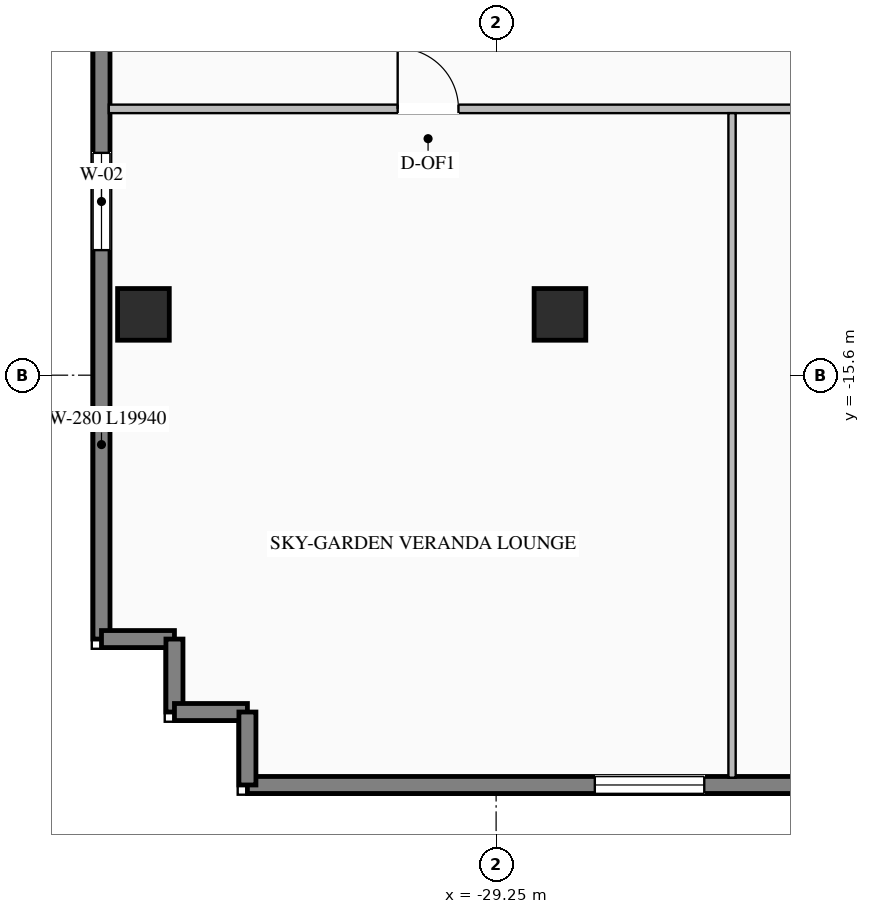
"""IFC4 building model, lengths in metres.
Left out: names, types, materials, properties, quantities, classifications, styles, units other than length and angle.
Written with IfcOpenShell. Run it as: python <this file> out.ifc"""

import sys

from ifc_helpers import new_model, si_unit, direction, frame, frame_2d, origin, origin_2d, place, context, subcontext, project, spatial, rectangle, i_section, extrude, element, fill, save


model = new_model("IFC4")
c1 = context("Model", 3, precision=1e-05, world=origin(), true_north=direction((0.0, 1.0)))
c2 = subcontext(c1, "Body", "Model", "MODEL_VIEW")
j1 = project(units=[si_unit("LENGTHUNIT", "METRE"), si_unit("PLANEANGLEUNIT", "RADIAN")], contexts=[c1])
p1 = place(None, origin())
s1 = spatial("IfcSite", under=j1, at=p1, CompositionType="ELEMENT")
p2 = place(p1, origin())
s2 = spatial("IfcBuilding", under=s1, at=p2, CompositionType="ELEMENT")
p3 = place(p2, frame((0.0, 0.0, 41.55)))
s3 = spatial("IfcBuildingStorey", under=s2, at=p3, CompositionType="ELEMENT", Elevation=41.55)
for number, where, z_axis, x_axis in (
    (1, (-28.2, -14.6, 0.0), (0.0, 0.0, 1.0), (1.0, 0.0, 0.0)),
    (2, (-35.05, -14.6, 0.0), (0.0, 0.0, 1.0), (1.0, 0.0, 0.0)),
):
    element("IfcColumn", number, at=place(p3, frame(where, z_axis=z_axis, x_axis=x_axis)), inside=s3, PredefinedType="COLUMN", context=c2, shape_type="SweptSolid", body=[
        extrude(i_section(OverallWidth=0.85, OverallDepth=0.85, WebThickness=0.032, FlangeThickness=0.048, at=origin_2d()), origin(), (0.0, 0.0, 1.0), 3.45),
    ])
p4 = place(p3, frame((-13.5, -22.34, 0.0), z_axis=(0.0, 0.0, 1.0), x_axis=(-1.0, 0.0, 0.0)))
e3 = element("IfcWall", 3, at=p4, inside=s3, PredefinedType="STANDARD", context=c2, shape_type="SweptSolid", body=[
    extrude(rectangle(XDim=19.84, YDim=0.28, at=frame_2d((9.92, 0.0))), origin(), (0.0, 0.0, 1.0), 3.25),
])
p5 = place(p4, frame((5.713, 0.0, 0.76)))
e4 = element("IfcOpeningElement", 4, at=p5, cuts=e3, PredefinedType="OPENING", context=c2, shape_type="SweptSolid", body=[
    extrude(rectangle(XDim=1.8, YDim=1.95, at=frame_2d((0.9, 0.975))), frame((0.0, 0.15, 0.0), z_axis=(0.0, -1.0, 0.0), x_axis=(1.0, 0.0, 0.0)), (0.0, 0.0, 1.0), 0.3),
])
p6 = place(p4, frame((12.327, 0.0, 0.76)))
e5 = element("IfcOpeningElement", 5, at=p6, cuts=e3, PredefinedType="OPENING", context=c2, shape_type="SweptSolid", body=[
    extrude(rectangle(XDim=1.8, YDim=1.95, at=frame_2d((0.9, 0.975))), frame((0.0, 0.15, 0.0), z_axis=(0.0, -1.0, 0.0), x_axis=(1.0, 0.0, 0.0)), (0.0, 0.0, 1.0), 0.3),
])
p7 = place(p3, frame((-35.74, -19.94, 0.0), z_axis=(0.0, 0.0, 1.0), x_axis=(0.0, 1.0, 0.0)))
e6 = element("IfcWall", 6, at=p7, inside=s3, PredefinedType="STANDARD", context=c2, shape_type="SweptSolid", body=[
    extrude(rectangle(XDim=19.94, YDim=0.28, at=frame_2d((9.97, 0.0))), origin(), (0.0, 0.0, 1.0), 3.25),
])
p8 = place(p7, frame((6.397, 0.0, 0.76)))
e7 = element("IfcOpeningElement", 7, at=p8, cuts=e6, PredefinedType="OPENING", context=c2, shape_type="SweptSolid", body=[
    extrude(rectangle(XDim=1.6, YDim=1.95, at=frame_2d((0.8, 0.975))), frame((0.0, 0.15, 0.0), z_axis=(0.0, -1.0, 0.0), x_axis=(1.0, 0.0, 0.0)), (0.0, 0.0, 1.0), 0.3),
])
p9 = place(p7, frame((12.493, 0.0, 0.76)))
e8 = element("IfcOpeningElement", 8, at=p9, cuts=e6, PredefinedType="OPENING", context=c2, shape_type="SweptSolid", body=[
    extrude(rectangle(XDim=1.6, YDim=1.95, at=frame_2d((0.8, 0.975))), frame((0.0, 0.15, 0.0), z_axis=(0.0, -1.0, 0.0), x_axis=(1.0, 0.0, 0.0)), (0.0, 0.0, 1.0), 0.3),
])
for number, where, z_axis, x_axis in (
    (9, (-35.74, -19.94, 0.0), (0.0, 0.0, 1.0), (1.0, 0.0, 0.0)),
    (10, (-34.54, -19.94, 0.0), (0.0, 0.0, 1.0), (0.0, -1.0, 0.0)),
    (11, (-34.54, -21.14, 0.0), (0.0, 0.0, 1.0), (1.0, 0.0, 0.0)),
):
    element("IfcWall", number, at=place(p3, frame(where, z_axis=z_axis, x_axis=x_axis)), inside=s3, PredefinedType="STANDARD", context=c2, shape_type="SweptSolid", body=[
        extrude(rectangle(XDim=1.2, YDim=0.28, at=frame_2d((0.6, 0.0))), origin(), (0.0, 0.0, 1.0), 3.25),
    ])
p10 = place(p3, frame((-33.34, -21.14, 0.0), z_axis=(0.0, 0.0, 1.0), x_axis=(0.0, -1.0, 0.0)))
e12 = element("IfcWall", 12, at=p10, inside=s3, PredefinedType="STANDARD", context=c2, shape_type="SweptSolid", body=[
    extrude(rectangle(XDim=1.2, YDim=0.28, at=frame_2d((0.6, 0.0))), origin(), (0.0, 0.0, 1.0), 3.25),
])
p11 = place(p3, frame((-35.62, -11.22, 0.0), z_axis=(0.0, 0.0, 1.0), x_axis=(1.0, 0.0, 0.0)))
e13 = element("IfcWall", 13, at=p11, inside=s3, PredefinedType="STANDARD", context=c2, shape_type="SweptSolid", body=[
    extrude(rectangle(XDim=71.24, YDim=0.14, at=frame_2d((35.62, 0.0))), origin(), (0.0, 0.0, 1.0), 2.745),
])
p12 = place(p11, frame((42.11, 0.0, 0.0)))
e14 = element("IfcOpeningElement", 14, at=p12, cuts=e13, PredefinedType="OPENING", context=c2, shape_type="SweptSolid", body=[
    extrude(rectangle(XDim=0.92, YDim=2.08, at=frame_2d((0.46, 1.04))), frame((0.0, 0.08, 0.0), z_axis=(0.0, -1.0, 0.0), x_axis=(1.0, 0.0, 0.0)), (0.0, 0.0, 1.0), 0.16),
])
p13 = place(p11, frame((45.61, 0.0, 0.0)))
e15 = element("IfcOpeningElement", 15, at=p13, cuts=e13, PredefinedType="OPENING", context=c2, shape_type="SweptSolid", body=[
    extrude(rectangle(XDim=0.92, YDim=2.08, at=frame_2d((0.46, 1.04))), frame((0.0, 0.08, 0.0), z_axis=(0.0, -1.0, 0.0), x_axis=(1.0, 0.0, 0.0)), (0.0, 0.0, 1.0), 0.16),
])
p14 = place(p11, frame((48.46, 0.0, 0.0)))
e16 = element("IfcOpeningElement", 16, at=p14, cuts=e13, PredefinedType="OPENING", context=c2, shape_type="SweptSolid", body=[
    extrude(rectangle(XDim=0.92, YDim=2.08, at=frame_2d((0.46, 1.04))), frame((0.0, 0.08, 0.0), z_axis=(0.0, -1.0, 0.0), x_axis=(1.0, 0.0, 0.0)), (0.0, 0.0, 1.0), 0.16),
])
p15 = place(p11, frame((4.751, 0.0, 0.0)))
e17 = element("IfcOpeningElement", 17, at=p15, cuts=e13, PredefinedType="OPENING", context=c2, shape_type="SweptSolid", body=[
    extrude(rectangle(XDim=1.0, YDim=2.08, at=frame_2d((0.5, 1.04))), frame((0.0, 0.08, 0.0), z_axis=(0.0, -1.0, 0.0), x_axis=(1.0, 0.0, 0.0)), (0.0, 0.0, 1.0), 0.16),
])
p16 = place(p11, frame((15.252, 0.0, 0.0)))
e18 = element("IfcOpeningElement", 18, at=p16, cuts=e13, PredefinedType="OPENING", context=c2, shape_type="SweptSolid", body=[
    extrude(rectangle(XDim=1.0, YDim=2.08, at=frame_2d((0.5, 1.04))), frame((0.0, 0.08, 0.0), z_axis=(0.0, -1.0, 0.0), x_axis=(1.0, 0.0, 0.0)), (0.0, 0.0, 1.0), 0.16),
])
p17 = place(p11, frame((26.054, 0.0, 0.0)))
e19 = element("IfcOpeningElement", 19, at=p17, cuts=e13, PredefinedType="OPENING", context=c2, shape_type="SweptSolid", body=[
    extrude(rectangle(XDim=1.0, YDim=2.08, at=frame_2d((0.5, 1.04))), frame((0.0, 0.08, 0.0), z_axis=(0.0, -1.0, 0.0), x_axis=(1.0, 0.0, 0.0)), (0.0, 0.0, 1.0), 0.16),
])
p18 = place(p11, frame((35.836, 0.0, 0.0)))
e20 = element("IfcOpeningElement", 20, at=p18, cuts=e13, PredefinedType="OPENING", context=c2, shape_type="SweptSolid", body=[
    extrude(rectangle(XDim=1.0, YDim=2.08, at=frame_2d((0.5, 1.04))), frame((0.0, 0.08, 0.0), z_axis=(0.0, -1.0, 0.0), x_axis=(1.0, 0.0, 0.0)), (0.0, 0.0, 1.0), 0.16),
])
p19 = place(p11, frame((52.165, 0.0, 0.0)))
e21 = element("IfcOpeningElement", 21, at=p19, cuts=e13, PredefinedType="OPENING", context=c2, shape_type="SweptSolid", body=[
    extrude(rectangle(XDim=1.0, YDim=2.08, at=frame_2d((0.5, 1.04))), frame((0.0, 0.08, 0.0), z_axis=(0.0, -1.0, 0.0), x_axis=(1.0, 0.0, 0.0)), (0.0, 0.0, 1.0), 0.16),
])
p20 = place(p11, frame((57.667, 0.0, 0.0)))
e22 = element("IfcOpeningElement", 22, at=p20, cuts=e13, PredefinedType="OPENING", context=c2, shape_type="SweptSolid", body=[
    extrude(rectangle(XDim=1.0, YDim=2.08, at=frame_2d((0.5, 1.04))), frame((0.0, 0.08, 0.0), z_axis=(0.0, -1.0, 0.0), x_axis=(1.0, 0.0, 0.0)), (0.0, 0.0, 1.0), 0.16),
])
p21 = place(p11, frame((63.274, 0.0, 0.0)))
e23 = element("IfcOpeningElement", 23, at=p21, cuts=e13, PredefinedType="OPENING", context=c2, shape_type="SweptSolid", body=[
    extrude(rectangle(XDim=1.0, YDim=2.08, at=frame_2d((0.5, 1.04))), frame((0.0, 0.08, 0.0), z_axis=(0.0, -1.0, 0.0), x_axis=(1.0, 0.0, 0.0)), (0.0, 0.0, 1.0), 0.16),
])
p22 = place(p11, frame((68.257, 0.0, 0.0)))
e24 = element("IfcOpeningElement", 24, at=p22, cuts=e13, PredefinedType="OPENING", context=c2, shape_type="SweptSolid", body=[
    extrude(rectangle(XDim=1.0, YDim=2.08, at=frame_2d((0.5, 1.04))), frame((0.0, 0.08, 0.0), z_axis=(0.0, -1.0, 0.0), x_axis=(1.0, 0.0, 0.0)), (0.0, 0.0, 1.0), 0.16),
])
p23 = place(p3, frame((-25.37, -22.22, 0.0), z_axis=(0.0, 0.0, 1.0), x_axis=(0.0, 1.0, 0.0)))
e25 = element("IfcWall", 25, at=p23, inside=s3, PredefinedType="STANDARD", context=c2, shape_type="SweptSolid", body=[
    extrude(rectangle(XDim=10.93, YDim=0.12, at=frame_2d((5.465, 0.0))), origin(), (0.0, 0.0, 1.0), 3.25),
])
p24 = place(p6, origin())
e26 = element("IfcWindow", 26, at=p24, inside=s3, PartitioningType="SINGLE_PANEL", PredefinedType="WINDOW", context=c2, shape_type="SweptSolid", body=[
    extrude(rectangle(XDim=1.8, YDim=1.95, at=frame_2d((0.9, 0.975))), frame((0.0, 0.03, 0.0), z_axis=(0.0, -1.0, 0.0), x_axis=(1.0, 0.0, 0.0)), (0.0, 0.0, 1.0), 0.06),
])
fill(e5, e26)
p25 = place(p8, origin())
e27 = element("IfcWindow", 27, at=p25, inside=s3, PartitioningType="SINGLE_PANEL", PredefinedType="WINDOW", context=c2, shape_type="SweptSolid", body=[
    extrude(rectangle(XDim=1.6, YDim=1.95, at=frame_2d((0.8, 0.975))), frame((0.0, 0.03, 0.0), z_axis=(0.0, -1.0, 0.0), x_axis=(1.0, 0.0, 0.0)), (0.0, 0.0, 1.0), 0.06),
])
fill(e7, e27)
p26 = place(p15, origin())
e28 = element("IfcDoor", 28, at=p26, inside=s3, OperationType="SINGLE_SWING_LEFT", PredefinedType="DOOR", context=c2, shape_type="SweptSolid", body=[
    extrude(rectangle(XDim=1.0, YDim=2.08, at=frame_2d((0.5, 1.04))), frame((0.0, 0.025, 0.0), z_axis=(0.0, -1.0, 0.0), x_axis=(1.0, 0.0, 0.0)), (0.0, 0.0, 1.0), 0.05),
])
fill(e17, e28)
save(model, sys.argv[1])
